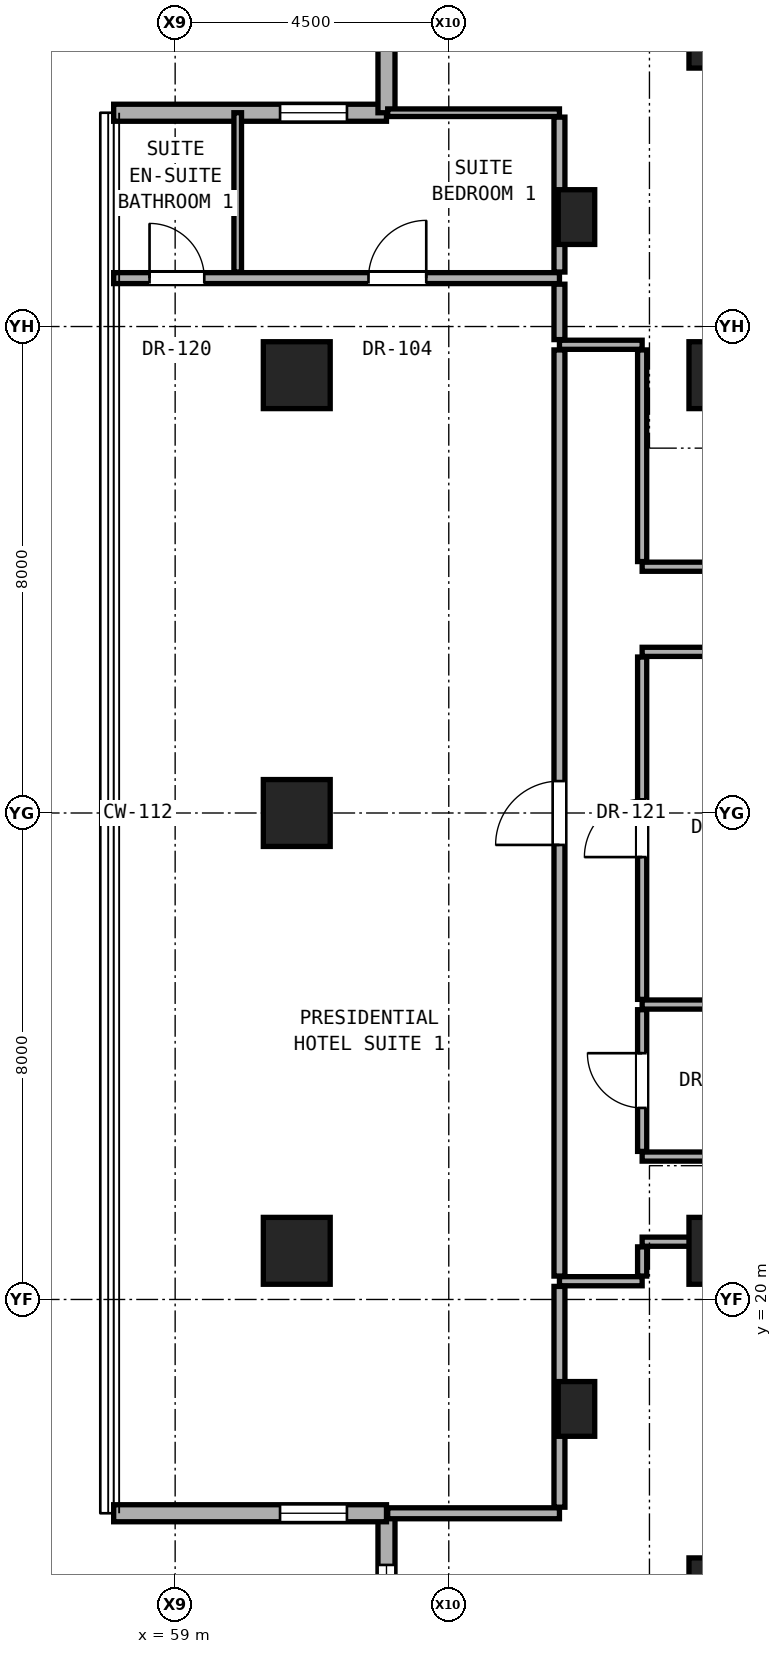
"""IFC4 building model, lengths in metres.
Left out: names, types, materials, properties, quantities, classifications, styles, units other than length and angle.
Written with IfcOpenShell. Run it as: python <this file> out.ifc"""

import sys

from ifc_helpers import new_model, si_unit, direction, frame, frame_2d, origin, origin_2d, place, context, subcontext, project, spatial, rectangle, hollow_rectangle, extrude, element, fill, save


model = new_model("IFC4")
c1 = context("Model", 3, precision=1e-05, world=origin(), true_north=direction((0.0, 1.0)))
c2 = subcontext(c1, "Body", "Model", "MODEL_VIEW")
j1 = project(units=[si_unit("LENGTHUNIT", "METRE"), si_unit("PLANEANGLEUNIT", "RADIAN")], contexts=[c1])
p1 = place(None, origin())
s1 = spatial("IfcSite", under=j1, at=p1, CompositionType="ELEMENT")
p2 = place(p1, origin())
s2 = spatial("IfcBuilding", under=s1, at=p2, CompositionType="ELEMENT")
p3 = place(p2, frame((0.0, 0.0, 141.2)))
s3 = spatial("IfcBuildingStorey", under=s2, at=p3, CompositionType="ELEMENT", Elevation=141.2)
for number, where, z_axis, x_axis in (
    (1, (68.0, 15.2, 0.0), (0.0, 0.0, 1.0), (1.0, 0.0, 0.0)),
    (2, (68.0, 20.8, 0.0), (0.0, 0.0, 1.0), (1.0, 0.0, 0.0)),
    (3, (68.0, 35.2, 0.0), (0.0, 0.0, 1.0), (1.0, 0.0, 0.0)),
    (4, (68.0, 40.8, 0.0), (0.0, 0.0, 1.0), (1.0, 0.0, 0.0)),
):
    element("IfcColumn", number, at=place(p3, frame(where, z_axis=z_axis, x_axis=x_axis)), inside=s3, PredefinedType="COLUMN", context=c2, shape_type="SweptSolid", body=[
        extrude(rectangle(XDim=1.1, YDim=1.1, at=origin_2d()), origin(), (0.0, 0.0, 1.0), 3.3),
    ])
for number, where, z_axis, x_axis in (
    (5, (61.0, 20.8, 0.0), (0.0, 0.0, 1.0), (1.0, 0.0, 0.0)),
    (6, (61.0, 28.0, 0.0), (0.0, 0.0, 1.0), (1.0, 0.0, 0.0)),
    (7, (61.0, 35.2, 0.0), (0.0, 0.0, 1.0), (1.0, 0.0, 0.0)),
):
    element("IfcColumn", number, at=place(p3, frame(where, z_axis=z_axis, x_axis=x_axis)), inside=s3, PredefinedType="COLUMN", context=c2, shape_type="SweptSolid", body=[
        extrude(hollow_rectangle(XDim=1.1, YDim=1.1, WallThickness=0.06, at=origin_2d()), origin(), (0.0, 0.0, 1.0), 3.3),
    ])
for number, where, z_axis, x_axis in (
    (8, (65.6, 18.2, 0.0), (0.0, 0.0, 1.0), (1.0, 0.0, 0.0)),
    (9, (65.6, 37.8, 0.0), (0.0, 0.0, 1.0), (1.0, 0.0, 0.0)),
):
    element("IfcColumn", number, at=place(p3, frame(where, z_axis=z_axis, x_axis=x_axis)), inside=s3, PredefinedType="PILASTER", context=c2, shape_type="SweptSolid", body=[
        extrude(rectangle(XDim=0.6, YDim=0.9, at=origin_2d()), origin(), (0.0, 0.0, 1.0), 3.3),
    ])
p4 = place(p3, frame((62.476, 16.484, 0.0), z_axis=(0.0, 0.0, 1.0), x_axis=(0.0, -1.0, 0.0)))
e10 = element("IfcWall", 10, at=p4, inside=s3, PredefinedType="SOLIDWALL", context=c2, shape_type="SweptSolid", body=[
    extrude(rectangle(XDim=4.487, YDim=0.28, at=frame_2d((2.243, 0.0))), origin(), (0.0, 0.0, 1.0), 3.06),
])
p5 = place(p4, frame((0.85, 0.0, 0.81)))
e11 = element("IfcOpeningElement", 11, at=p5, cuts=e10, PredefinedType="OPENING", context=c2, shape_type="SweptSolid", body=[
    extrude(rectangle(XDim=1.5, YDim=2.1, at=frame_2d((0.75, 1.05))), frame((0.0, 0.15, 0.0), z_axis=(0.0, -1.0, 0.0), x_axis=(1.0, 0.0, 0.0)), (0.0, 0.0, 1.0), 0.3),
])
p6 = place(p3, frame((57.989, 16.484, 0.0), z_axis=(0.0, 0.0, 1.0), x_axis=(1.0, 0.0, 0.0)))
e12 = element("IfcWall", 12, at=p6, inside=s3, PredefinedType="SOLIDWALL", context=c2, shape_type="SweptSolid", body=[
    extrude(rectangle(XDim=4.487, YDim=0.28, at=frame_2d((2.243, 0.0))), origin(), (0.0, 0.0, 1.0), 3.06),
])
p7 = place(p6, frame((2.736, 0.0, 0.85)))
e13 = element("IfcOpeningElement", 13, at=p7, cuts=e12, PredefinedType="OPENING", context=c2, shape_type="SweptSolid", body=[
    extrude(rectangle(XDim=1.1, YDim=2.0, at=frame_2d((0.55, 1.0))), frame((0.0, 0.15, 0.0), z_axis=(0.0, -1.0, 0.0), x_axis=(1.0, 0.0, 0.0)), (0.0, 0.0, 1.0), 0.3),
])
p8 = place(p3, frame((62.476, 39.516, 0.0), z_axis=(0.0, 0.0, 1.0), x_axis=(-1.0, 0.0, 0.0)))
e14 = element("IfcWall", 14, at=p8, inside=s3, PredefinedType="SOLIDWALL", context=c2, shape_type="SweptSolid", body=[
    extrude(rectangle(XDim=4.487, YDim=0.28, at=frame_2d((2.243, 0.0))), origin(), (0.0, 0.0, 1.0), 3.06),
])
p9 = place(p8, frame((0.65, 0.0, 0.85)))
e15 = element("IfcOpeningElement", 15, at=p9, cuts=e14, PredefinedType="OPENING", context=c2, shape_type="SweptSolid", body=[
    extrude(rectangle(XDim=1.1, YDim=2.0, at=frame_2d((0.55, 1.0))), frame((0.0, 0.15, 0.0), z_axis=(0.0, -1.0, 0.0), x_axis=(1.0, 0.0, 0.0)), (0.0, 0.0, 1.0), 0.3),
])
p10 = place(p3, frame((62.476, 44.002, 0.0), z_axis=(0.0, 0.0, 1.0), x_axis=(0.0, -1.0, 0.0)))
e16 = element("IfcWall", 16, at=p10, inside=s3, PredefinedType="SOLIDWALL", context=c2, shape_type="SweptSolid", body=[
    extrude(rectangle(XDim=4.487, YDim=0.28, at=frame_2d((2.243, 0.0))), origin(), (0.0, 0.0, 1.0), 3.06),
])
p11 = place(p3, frame((62.496, 16.484, 0.0), z_axis=(0.0, 0.0, 1.0), x_axis=(1.0, 0.0, 0.0)))
e17 = element("IfcWall", 17, at=p11, inside=s3, PredefinedType="PARTITIONING", context=c2, shape_type="SweptSolid", body=[
    extrude(rectangle(XDim=2.824, YDim=0.18, at=frame_2d((1.412, 0.0))), origin(), (0.0, 0.0, 1.0), 3.08),
])
p12 = place(p3, frame((65.32, 20.3, 0.0), z_axis=(0.0, 0.0, 1.0), x_axis=(1.0, 0.0, 0.0)))
e18 = element("IfcWall", 18, at=p12, inside=s3, PredefinedType="PARTITIONING", context=c2, shape_type="SweptSolid", body=[
    extrude(rectangle(XDim=1.36, YDim=0.15, at=frame_2d((0.68, 0.0))), origin(), (0.0, 0.0, 1.0), 3.08),
])
p13 = place(p3, frame((66.68, 20.95, 0.0), z_axis=(0.0, 0.0, 1.0), x_axis=(1.0, 0.0, 0.0)))
e19 = element("IfcWall", 19, at=p13, inside=s3, PredefinedType="PARTITIONING", context=c2, shape_type="SweptSolid", body=[
    extrude(rectangle(XDim=1.05, YDim=0.15, at=frame_2d((0.525, 0.0))), origin(), (0.0, 0.0, 1.0), 2.472),
])
p14 = place(p3, frame((66.68, 22.35, 0.0), z_axis=(0.0, 0.0, 1.0), x_axis=(1.0, 0.0, 0.0)))
e20 = element("IfcWall", 20, at=p14, inside=s3, PredefinedType="PARTITIONING", context=c2, shape_type="SweptSolid", body=[
    extrude(rectangle(XDim=19.5, YDim=0.15, at=frame_2d((9.75, 0.0))), origin(), (0.0, 0.0, 1.0), 2.216),
])
p15 = place(p14, frame((8.802, 0.0, 0.0)))
e21 = element("IfcOpeningElement", 21, at=p15, cuts=e20, PredefinedType="OPENING", context=c2, shape_type="SweptSolid", body=[
    extrude(rectangle(XDim=1.05, YDim=2.2, at=frame_2d((0.525, 1.1))), frame((0.0, 0.085, 0.0), z_axis=(0.0, -1.0, 0.0), x_axis=(1.0, 0.0, 0.0)), (0.0, 0.0, 1.0), 0.17),
])
p16 = place(p14, frame((15.846, 0.0, 0.0)))
e22 = element("IfcOpeningElement", 22, at=p16, cuts=e20, PredefinedType="OPENING", context=c2, shape_type="SweptSolid", body=[
    extrude(rectangle(XDim=1.05, YDim=2.2, at=frame_2d((0.525, 1.1))), frame((0.0, 0.085, 0.0), z_axis=(0.0, -1.0, 0.0), x_axis=(1.0, 0.0, 0.0)), (0.0, 0.0, 1.0), 0.17),
])
p17 = place(p3, frame((66.68, 24.85, 0.0), z_axis=(0.0, 0.0, 1.0), x_axis=(1.0, 0.0, 0.0)))
e23 = element("IfcWall", 23, at=p17, inside=s3, PredefinedType="PARTITIONING", context=c2, shape_type="SweptSolid", body=[
    extrude(rectangle(XDim=3.07, YDim=0.15, at=frame_2d((1.535, 0.0))), origin(), (0.0, 0.0, 1.0), 2.216),
])
p18 = place(p3, frame((66.68, 30.65, 0.0), z_axis=(0.0, 0.0, 1.0), x_axis=(1.0, 0.0, 0.0)))
e24 = element("IfcWall", 24, at=p18, inside=s3, PredefinedType="PARTITIONING", context=c2, shape_type="SweptSolid", body=[
    extrude(rectangle(XDim=19.5, YDim=0.15, at=frame_2d((9.75, 0.0))), origin(), (0.0, 0.0, 1.0), 2.216),
])
p19 = place(p18, frame((3.745, 0.0, 0.0)))
e25 = element("IfcOpeningElement", 25, at=p19, cuts=e24, PredefinedType="OPENING", context=c2, shape_type="SweptSolid", body=[
    extrude(rectangle(XDim=0.95, YDim=2.15, at=frame_2d((0.475, 1.075))), frame((0.0, 0.085, 0.0), z_axis=(0.0, -1.0, 0.0), x_axis=(1.0, 0.0, 0.0)), (0.0, 0.0, 1.0), 0.17),
])
p20 = place(p18, frame((8.802, 0.0, 0.0)))
e26 = element("IfcOpeningElement", 26, at=p20, cuts=e24, PredefinedType="OPENING", context=c2, shape_type="SweptSolid", body=[
    extrude(rectangle(XDim=1.05, YDim=2.2, at=frame_2d((0.525, 1.1))), frame((0.0, 0.085, 0.0), z_axis=(0.0, -1.0, 0.0), x_axis=(1.0, 0.0, 0.0)), (0.0, 0.0, 1.0), 0.17),
])
p21 = place(p18, frame((15.846, 0.0, 0.0)))
e27 = element("IfcOpeningElement", 27, at=p21, cuts=e24, PredefinedType="OPENING", context=c2, shape_type="SweptSolid", body=[
    extrude(rectangle(XDim=1.05, YDim=2.2, at=frame_2d((0.525, 1.1))), frame((0.0, 0.085, 0.0), z_axis=(0.0, -1.0, 0.0), x_axis=(1.0, 0.0, 0.0)), (0.0, 0.0, 1.0), 0.17),
])
p22 = place(p3, frame((66.68, 32.05, 0.0), z_axis=(0.0, 0.0, 1.0), x_axis=(1.0, 0.0, 0.0)))
e28 = element("IfcWall", 28, at=p22, inside=s3, PredefinedType="PARTITIONING", context=c2, shape_type="SweptSolid", body=[
    extrude(rectangle(XDim=2.12, YDim=0.15, at=frame_2d((1.06, 0.0))), origin(), (0.0, 0.0, 1.0), 2.216),
])
p23 = place(p3, frame((65.32, 35.7, 0.0), z_axis=(0.0, 0.0, 1.0), x_axis=(1.0, 0.0, 0.0)))
e29 = element("IfcWall", 29, at=p23, inside=s3, PredefinedType="PARTITIONING", context=c2, shape_type="SweptSolid", body=[
    extrude(rectangle(XDim=1.36, YDim=0.15, at=frame_2d((0.68, 0.0))), origin(), (0.0, 0.0, 1.0), 3.08),
])
p24 = place(p3, frame((57.989, 36.796, 0.0), z_axis=(0.0, 0.0, 1.0), x_axis=(1.0, 0.0, 0.0)))
e30 = element("IfcWall", 30, at=p24, inside=s3, PredefinedType="PARTITIONING", context=c2, shape_type="SweptSolid", body=[
    extrude(rectangle(XDim=7.331, YDim=0.18, at=frame_2d((3.666, 0.0))), origin(), (0.0, 0.0, 1.0), 2.523),
])
p25 = place(p24, frame((4.19, 0.0, 0.0)))
e31 = element("IfcOpeningElement", 31, at=p25, cuts=e30, PredefinedType="OPENING", context=c2, shape_type="SweptSolid", body=[
    extrude(rectangle(XDim=0.95, YDim=2.15, at=frame_2d((0.475, 1.075))), frame((0.0, 0.1, 0.0), z_axis=(0.0, -1.0, 0.0), x_axis=(1.0, 0.0, 0.0)), (0.0, 0.0, 1.0), 0.2),
])
p26 = place(p24, frame((0.59, 0.0, 0.0)))
e32 = element("IfcOpeningElement", 32, at=p26, cuts=e30, PredefinedType="OPENING", context=c2, shape_type="SweptSolid", body=[
    extrude(rectangle(XDim=0.9, YDim=2.1, at=frame_2d((0.45, 1.05))), frame((0.0, 0.1, 0.0), z_axis=(0.0, -1.0, 0.0), x_axis=(1.0, 0.0, 0.0)), (0.0, 0.0, 1.0), 0.2),
])
p27 = place(p3, frame((62.496, 39.516, 0.0), z_axis=(0.0, 0.0, 1.0), x_axis=(1.0, 0.0, 0.0)))
e33 = element("IfcWall", 33, at=p27, inside=s3, PredefinedType="PARTITIONING", context=c2, shape_type="SweptSolid", body=[
    extrude(rectangle(XDim=2.824, YDim=0.125, at=frame_2d((1.412, 0.0))), origin(), (0.0, 0.0, 1.0), 3.08),
])
p28 = place(p3, frame((60.029, 36.896, 0.0), z_axis=(0.0, 0.0, 1.0), x_axis=(0.0, 1.0, 0.0)))
e34 = element("IfcWall", 34, at=p28, inside=s3, PredefinedType="PARTITIONING", context=c2, shape_type="SweptSolid", body=[
    extrude(rectangle(XDim=2.62, YDim=0.125, at=frame_2d((1.31, 0.0))), origin(), (0.0, 0.0, 1.0), 3.08),
])
p29 = place(p3, frame((65.32, 16.584, 0.0), z_axis=(0.0, 0.0, 1.0), x_axis=(0.0, 1.0, 0.0)))
e35 = element("IfcWall", 35, at=p29, inside=s3, PredefinedType="PARTITIONING", context=c2, shape_type="SweptSolid", body=[
    extrude(rectangle(XDim=3.631, YDim=0.18, at=frame_2d((1.815, 0.0))), origin(), (0.0, 0.0, 1.0), 2.523),
])
p30 = place(p3, frame((65.32, 20.385, 0.0), z_axis=(0.0, 0.0, 1.0), x_axis=(0.0, 1.0, 0.0)))
e36 = element("IfcWall", 36, at=p30, inside=s3, PredefinedType="PARTITIONING", context=c2, shape_type="SweptSolid", body=[
    extrude(rectangle(XDim=15.23, YDim=0.18, at=frame_2d((7.615, 0.0))), origin(), (0.0, 0.0, 1.0), 2.376),
])
p31 = place(p30, frame((7.09, 0.0, 0.0)))
e37 = element("IfcOpeningElement", 37, at=p31, cuts=e36, PredefinedType="OPENING", context=c2, shape_type="SweptSolid", body=[
    extrude(rectangle(XDim=1.05, YDim=2.2, at=frame_2d((0.525, 1.1))), frame((0.0, 0.1, 0.0), z_axis=(0.0, -1.0, 0.0), x_axis=(1.0, 0.0, 0.0)), (0.0, 0.0, 1.0), 0.2),
])
p32 = place(p3, frame((65.32, 35.785, 0.0), z_axis=(0.0, 0.0, 1.0), x_axis=(0.0, 1.0, 0.0)))
e38 = element("IfcWall", 38, at=p32, inside=s3, PredefinedType="PARTITIONING", context=c2, shape_type="SweptSolid", body=[
    extrude(rectangle(XDim=0.911, YDim=0.18, at=frame_2d((0.456, 0.0))), origin(), (0.0, 0.0, 1.0), 3.08),
])
p33 = place(p3, frame((65.32, 36.896, 0.0), z_axis=(0.0, 0.0, 1.0), x_axis=(0.0, 1.0, 0.0)))
e39 = element("IfcWall", 39, at=p33, inside=s3, PredefinedType="PARTITIONING", context=c2, shape_type="SweptSolid", body=[
    extrude(rectangle(XDim=2.548, YDim=0.18, at=frame_2d((1.274, 0.0))), origin(), (0.0, 0.0, 1.0), 2.523),
])
p34 = place(p3, frame((66.68, 20.385, 0.0), z_axis=(0.0, 0.0, 1.0), x_axis=(0.0, 1.0, 0.0)))
e40 = element("IfcWall", 40, at=p34, inside=s3, PredefinedType="PARTITIONING", context=c2, shape_type="SweptSolid", body=[
    extrude(rectangle(XDim=0.48, YDim=0.15, at=frame_2d((0.24, 0.0))), origin(), (0.0, 0.0, 1.0), 2.472),
])
p35 = place(p3, frame((66.68, 22.435, 0.0), z_axis=(0.0, 0.0, 1.0), x_axis=(0.0, 1.0, 0.0)))
e41 = element("IfcWall", 41, at=p35, inside=s3, PredefinedType="PARTITIONING", context=c2, shape_type="SweptSolid", body=[
    extrude(rectangle(XDim=2.33, YDim=0.15, at=frame_2d((1.165, 0.0))), origin(), (0.0, 0.0, 1.0), 3.08),
])
p36 = place(p35, frame((0.715, 0.0, 0.0)))
e42 = element("IfcOpeningElement", 42, at=p36, cuts=e41, PredefinedType="OPENING", context=c2, shape_type="SweptSolid", body=[
    extrude(rectangle(XDim=0.9, YDim=2.1, at=frame_2d((0.45, 1.05))), frame((0.0, 0.085, 0.0), z_axis=(0.0, -1.0, 0.0), x_axis=(1.0, 0.0, 0.0)), (0.0, 0.0, 1.0), 0.17),
])
p37 = place(p3, frame((66.68, 24.935, 0.0), z_axis=(0.0, 0.0, 1.0), x_axis=(0.0, 1.0, 0.0)))
e43 = element("IfcWall", 43, at=p37, inside=s3, PredefinedType="PARTITIONING", context=c2, shape_type="SweptSolid", body=[
    extrude(rectangle(XDim=5.63, YDim=0.15, at=frame_2d((2.815, 0.0))), origin(), (0.0, 0.0, 1.0), 2.376),
])
p38 = place(p37, frame((2.34, 0.0, 0.0)))
e44 = element("IfcOpeningElement", 44, at=p38, cuts=e43, PredefinedType="OPENING", context=c2, shape_type="SweptSolid", body=[
    extrude(rectangle(XDim=0.95, YDim=2.15, at=frame_2d((0.475, 1.075))), frame((0.0, 0.085, 0.0), z_axis=(0.0, -1.0, 0.0), x_axis=(1.0, 0.0, 0.0)), (0.0, 0.0, 1.0), 0.17),
])
p39 = place(p3, frame((66.68, 32.135, 0.0), z_axis=(0.0, 0.0, 1.0), x_axis=(0.0, 1.0, 0.0)))
e45 = element("IfcWall", 45, at=p39, inside=s3, PredefinedType="PARTITIONING", context=c2, shape_type="SweptSolid", body=[
    extrude(rectangle(XDim=3.48, YDim=0.15, at=frame_2d((1.74, 0.0))), origin(), (0.0, 0.0, 1.0), 2.472),
])
p40 = place(p5, origin())
e46 = element("IfcWindow", 46, at=p40, inside=s3, PartitioningType="SINGLE_PANEL", PredefinedType="WINDOW", context=c2, shape_type="SweptSolid", body=[
    extrude(rectangle(XDim=1.5, YDim=2.1, at=frame_2d((0.75, 1.05))), frame((0.0, 0.03, 0.0), z_axis=(0.0, -1.0, 0.0), x_axis=(1.0, 0.0, 0.0)), (0.0, 0.0, 1.0), 0.06),
])
fill(e11, e46)
p41 = place(p7, origin())
e47 = element("IfcWindow", 47, at=p41, inside=s3, PartitioningType="SINGLE_PANEL", PredefinedType="WINDOW", context=c2, shape_type="SweptSolid", body=[
    extrude(rectangle(XDim=1.1, YDim=2.0, at=frame_2d((0.55, 1.0))), frame((0.0, 0.03, 0.0), z_axis=(0.0, -1.0, 0.0), x_axis=(1.0, 0.0, 0.0)), (0.0, 0.0, 1.0), 0.06),
])
fill(e13, e47)
p42 = place(p9, origin())
e48 = element("IfcWindow", 48, at=p42, inside=s3, PartitioningType="SINGLE_PANEL", PredefinedType="WINDOW", context=c2, shape_type="SweptSolid", body=[
    extrude(rectangle(XDim=1.1, YDim=2.0, at=frame_2d((0.55, 1.0))), frame((0.0, 0.03, 0.0), z_axis=(0.0, -1.0, 0.0), x_axis=(1.0, 0.0, 0.0)), (0.0, 0.0, 1.0), 0.06),
])
fill(e15, e48)
p43 = place(p36, origin())
e49 = element("IfcDoor", 49, at=p43, inside=s3, OperationType="SINGLE_SWING_RIGHT", PredefinedType="DOOR", context=c2, shape_type="SweptSolid", body=[
    extrude(rectangle(XDim=0.9, YDim=2.1, at=frame_2d((0.45, 1.05))), frame((0.0, 0.025, 0.0), z_axis=(0.0, -1.0, 0.0), x_axis=(1.0, 0.0, 0.0)), (0.0, 0.0, 1.0), 0.05),
])
fill(e42, e49)
p44 = place(p31, origin())
e50 = element("IfcDoor", 50, at=p44, inside=s3, OperationType="SINGLE_SWING_LEFT", PredefinedType="DOOR", context=c2, shape_type="SweptSolid", body=[
    extrude(rectangle(XDim=1.05, YDim=2.2, at=frame_2d((0.525, 1.1))), frame((0.0, 0.025, 0.0), z_axis=(0.0, -1.0, 0.0), x_axis=(1.0, 0.0, 0.0)), (0.0, 0.0, 1.0), 0.05),
])
fill(e37, e50)
p45 = place(p25, origin())
e51 = element("IfcDoor", 51, at=p45, inside=s3, OperationType="SINGLE_SWING_RIGHT", PredefinedType="DOOR", context=c2, shape_type="SweptSolid", body=[
    extrude(rectangle(XDim=0.95, YDim=2.15, at=frame_2d((0.475, 1.075))), frame((0.0, 0.025, 0.0), z_axis=(0.0, -1.0, 0.0), x_axis=(1.0, 0.0, 0.0)), (0.0, 0.0, 1.0), 0.05),
])
fill(e31, e51)
p46 = place(p26, origin())
e52 = element("IfcDoor", 52, at=p46, inside=s3, OperationType="SINGLE_SWING_LEFT", PredefinedType="DOOR", context=c2, shape_type="SweptSolid", body=[
    extrude(rectangle(XDim=0.9, YDim=2.1, at=frame_2d((0.45, 1.05))), frame((0.0, 0.025, 0.0), z_axis=(0.0, -1.0, 0.0), x_axis=(1.0, 0.0, 0.0)), (0.0, 0.0, 1.0), 0.05),
])
fill(e32, e52)
p47 = place(p38, origin())
e53 = element("IfcDoor", 53, at=p47, inside=s3, OperationType="SINGLE_SWING_LEFT", PredefinedType="DOOR", context=c2, shape_type="SweptSolid", body=[
    extrude(rectangle(XDim=0.95, YDim=2.15, at=frame_2d((0.475, 1.075))), frame((0.0, 0.025, 0.0), z_axis=(0.0, -1.0, 0.0), x_axis=(1.0, 0.0, 0.0)), (0.0, 0.0, 1.0), 0.05),
])
fill(e44, e53)
save(model, sys.argv[1])
